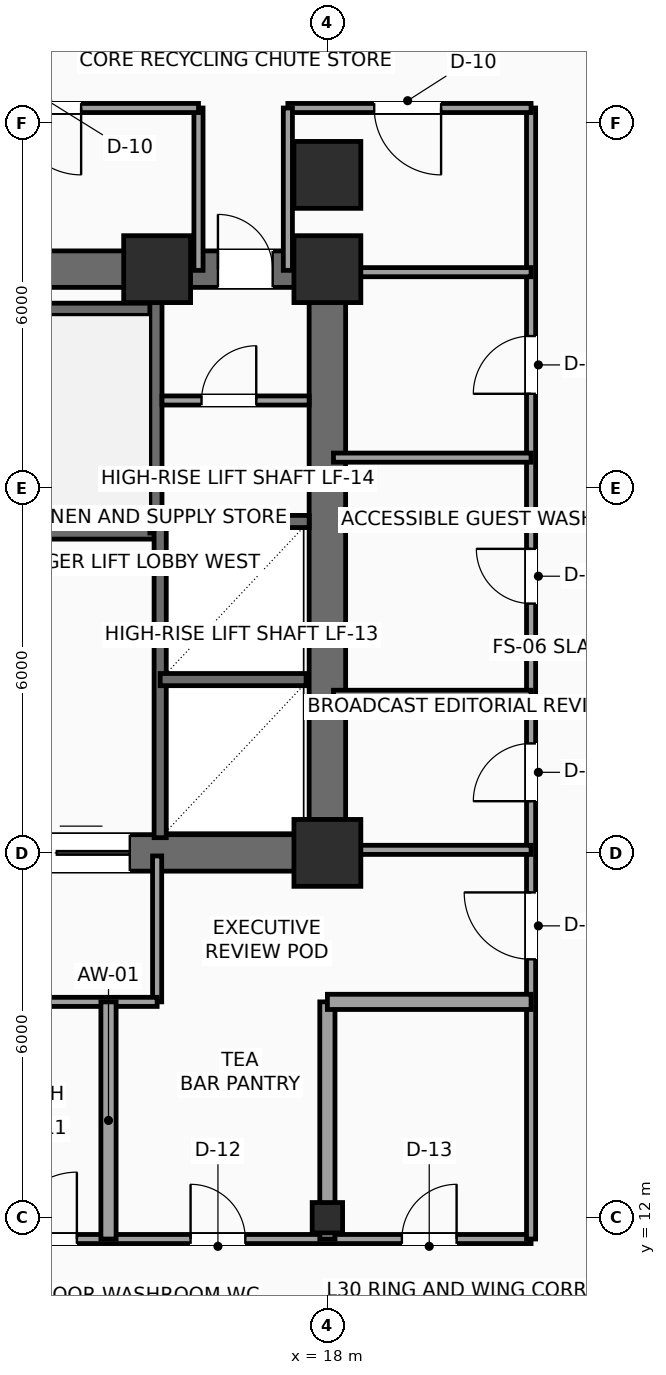
"""IFC4 building model, lengths in metres.
Left out: names, types, materials, properties, quantities, classifications, styles, units other than length and angle.
Written with IfcOpenShell. Run it as: python <this file> out.ifc"""

import sys

from ifc_helpers import new_model, si_unit, direction, frame, frame_2d, origin, origin_2d, place, context, subcontext, project, spatial, rectangle, hollow_rectangle, extrude, element, fill, save


model = new_model("IFC4")
c1 = context("Model", 3, precision=1e-05, world=origin(), true_north=direction((0.0, 1.0)))
c2 = subcontext(c1, "Body", "Model", "MODEL_VIEW")
j1 = project(units=[si_unit("LENGTHUNIT", "METRE"), si_unit("PLANEANGLEUNIT", "RADIAN")], contexts=[c1])
p1 = place(None, origin())
s1 = spatial("IfcSite", under=j1, at=p1, CompositionType="ELEMENT")
p2 = place(p1, origin())
s2 = spatial("IfcBuilding", under=s1, at=p2, CompositionType="ELEMENT")
p3 = place(p2, frame((0.0, 0.0, 126.9)))
s3 = spatial("IfcBuildingStorey", under=s2, at=p3, CompositionType="ELEMENT", Elevation=126.9)
for number, where, z_axis, x_axis in (
    (1, (18.0, 18.0, 0.0), (0.0, 0.0, 1.0), (1.0, 0.0, 0.0)),
    (2, (15.2, 27.6, 0.0), (0.0, 0.0, 1.0), (1.0, 0.0, 0.0)),
    (3, (18.0, 27.6, 0.0), (0.0, 0.0, 1.0), (1.0, 0.0, 0.0)),
):
    element("IfcColumn", number, at=place(p3, frame(where, z_axis=z_axis, x_axis=x_axis)), inside=s3, PredefinedType="COLUMN", context=c2, shape_type="SweptSolid", body=[
        extrude(rectangle(XDim=1.1, YDim=1.1, at=origin_2d()), origin(), (0.0, 0.0, 1.0), 3.75),
    ])
p4 = place(p3, frame((18.0, 12.0, 0.0), z_axis=(0.0, 0.0, 1.0), x_axis=(1.0, 0.0, 0.0)))
e4 = element("IfcColumn", 4, at=p4, inside=s3, PredefinedType="COLUMN", context=c2, shape_type="SweptSolid", body=[
    extrude(hollow_rectangle(XDim=0.5, YDim=0.5, WallThickness=0.025, InnerFilletRadius=0.025, OuterFilletRadius=0.04, at=origin_2d()), origin(), (0.0, 0.0, 1.0), 3.75),
])
p5 = place(p3, frame((18.0, 29.15, 0.0), z_axis=(0.0, 0.0, 1.0), x_axis=(1.0, 0.0, 0.0)))
e5 = element("IfcColumn", 5, at=p5, inside=s3, PredefinedType="COLUMN", context=c2, shape_type="SweptSolid", body=[
    extrude(rectangle(XDim=1.1, YDim=1.1, at=origin_2d()), origin(), (0.0, 0.0, 1.0), 3.75),
])
p6 = place(p3, frame((6.0, 18.0, 0.0), z_axis=(0.0, 0.0, 1.0), x_axis=(1.0, 0.0, 0.0)))
e6 = element("IfcWall", 6, at=p6, inside=s3, PredefinedType="SHEAR", context=c2, shape_type="SweptSolid", body=[
    extrude(rectangle(XDim=12.0, YDim=0.6, at=frame_2d((6.0, 0.0))), origin(), (0.0, 0.0, 1.0), 3.525),
])
p7 = place(p6, frame((7.15, 0.0, 0.0)))
e7 = element("IfcOpeningElement", 7, at=p7, cuts=e6, PredefinedType="OPENING", context=c2, shape_type="SweptSolid", body=[
    extrude(rectangle(XDim=1.6, YDim=2.3, at=frame_2d((0.8, 1.15))), frame((0.0, 0.31, 0.0), z_axis=(0.0, -1.0, 0.0), x_axis=(1.0, 0.0, 0.0)), (0.0, 0.0, 1.0), 0.62),
])
p8 = place(p3, frame((6.0, 27.6, 0.0), z_axis=(0.0, 0.0, 1.0), x_axis=(1.0, 0.0, 0.0)))
e8 = element("IfcWall", 8, at=p8, inside=s3, PredefinedType="SHEAR", context=c2, shape_type="SweptSolid", body=[
    extrude(rectangle(XDim=12.0, YDim=0.6, at=frame_2d((6.0, 0.0))), origin(), (0.0, 0.0, 1.0), 3.525),
])
p9 = place(p8, frame((10.2, 0.0, 0.0)))
e9 = element("IfcOpeningElement", 9, at=p9, cuts=e8, PredefinedType="OPENING", context=c2, shape_type="SweptSolid", body=[
    extrude(rectangle(XDim=0.9, YDim=2.15, at=frame_2d((0.45, 1.075))), frame((0.0, 0.31, 0.0), z_axis=(0.0, -1.0, 0.0), x_axis=(1.0, 0.0, 0.0)), (0.0, 0.0, 1.0), 0.62),
])
p10 = place(p3, frame((18.0, 18.0, 0.0), z_axis=(0.0, 0.0, 1.0), x_axis=(0.0, 1.0, 0.0)))
e10 = element("IfcWall", 10, at=p10, inside=s3, PredefinedType="SHEAR", context=c2, shape_type="SweptSolid", body=[
    extrude(rectangle(XDim=9.6, YDim=0.6, at=frame_2d((4.8, 0.0))), origin(), (0.0, 0.0, 1.0), 3.525),
])
p11 = place(p3, frame((6.3, 23.26, 0.0), z_axis=(0.0, 0.0, 1.0), x_axis=(1.0, 0.0, 0.0)))
e11 = element("IfcWall", 11, at=p11, inside=s3, PredefinedType="SHEAR", context=c2, shape_type="SweptSolid", body=[
    extrude(rectangle(XDim=8.88, YDim=0.2, at=frame_2d((4.44, 0.0))), origin(), (0.0, 0.0, 1.0), 3.525),
])
p12 = place(p11, frame((0.35, 0.0, 0.0)))
e12 = element("IfcOpeningElement", 12, at=p12, cuts=e11, PredefinedType="OPENING", context=c2, shape_type="SweptSolid", body=[
    extrude(rectangle(XDim=1.1, YDim=2.2, at=frame_2d((0.55, 1.1))), frame((0.0, 0.11, 0.0), z_axis=(0.0, -1.0, 0.0), x_axis=(1.0, 0.0, 0.0)), (0.0, 0.0, 1.0), 0.22),
])
p13 = place(p3, frame((6.3, 26.94, 0.0), z_axis=(0.0, 0.0, 1.0), x_axis=(1.0, 0.0, 0.0)))
e13 = element("IfcWall", 13, at=p13, inside=s3, PredefinedType="SHEAR", context=c2, shape_type="SweptSolid", body=[
    extrude(rectangle(XDim=8.88, YDim=0.2, at=frame_2d((4.44, 0.0))), origin(), (0.0, 0.0, 1.0), 3.525),
])
p14 = place(p3, frame((15.18, 23.26, 0.0), z_axis=(0.0, 0.0, 1.0), x_axis=(0.0, 1.0, 0.0)))
e14 = element("IfcWall", 14, at=p14, inside=s3, PredefinedType="SHEAR", context=c2, shape_type="SweptSolid", body=[
    extrude(rectangle(XDim=4.04, YDim=0.2, at=frame_2d((2.02, 0.0))), origin(), (0.0, 0.0, 1.0), 3.525),
])
p15 = place(p3, frame((15.25, 18.25, 0.0), z_axis=(0.0, 0.0, 1.0), x_axis=(0.0, 1.0, 0.0)))
e15 = element("IfcWall", 15, at=p15, inside=s3, PredefinedType="SHEAR", context=c2, shape_type="SweptSolid", body=[
    extrude(rectangle(XDim=5.2, YDim=0.2, at=frame_2d((2.6, 0.0))), origin(), (0.0, 0.0, 1.0), 3.525),
])
p16 = place(p3, frame((15.25, 20.85, 0.0), z_axis=(0.0, 0.0, 1.0), x_axis=(1.0, 0.0, 0.0)))
e16 = element("IfcWall", 16, at=p16, inside=s3, PredefinedType="SHEAR", context=c2, shape_type="SweptSolid", body=[
    extrude(rectangle(XDim=2.4, YDim=0.2, at=frame_2d((1.2, 0.0))), origin(), (0.0, 0.0, 1.0), 3.525),
])
p17 = place(p3, frame((15.25, 23.45, 0.0), z_axis=(0.0, 0.0, 1.0), x_axis=(1.0, 0.0, 0.0)))
e17 = element("IfcWall", 17, at=p17, inside=s3, PredefinedType="SHEAR", context=c2, shape_type="SweptSolid", body=[
    extrude(rectangle(XDim=2.45, YDim=0.2, at=frame_2d((1.225, 0.0))), origin(), (0.0, 0.0, 1.0), 3.525),
])
p18 = place(p3, frame((15.28, 25.44, 0.0), z_axis=(0.0, 0.0, 1.0), x_axis=(1.0, 0.0, 0.0)))
e18 = element("IfcWall", 18, at=p18, inside=s3, PredefinedType="PARTITIONING", context=c2, shape_type="SweptSolid", body=[
    extrude(rectangle(XDim=2.42, YDim=0.15, at=frame_2d((1.21, 0.0))), origin(), (0.0, 0.0, 1.0), 3.525),
])
p19 = place(p18, frame((0.65, 0.0, 0.0)))
e19 = element("IfcOpeningElement", 19, at=p19, cuts=e18, PredefinedType="OPENING", context=c2, shape_type="SweptSolid", body=[
    extrude(rectangle(XDim=0.9, YDim=2.15, at=frame_2d((0.45, 1.075))), frame((0.0, 0.085, 0.0), z_axis=(0.0, -1.0, 0.0), x_axis=(1.0, 0.0, 0.0)), (0.0, 0.0, 1.0), 0.17),
])
p20 = place(p3, frame((15.2, 17.95, 0.0), z_axis=(0.0, 0.0, 1.0), x_axis=(0.0, -1.0, 0.0)))
e20 = element("IfcWall", 20, at=p20, inside=s3, PredefinedType="PARTITIONING", context=c2, shape_type="SweptSolid", body=[
    extrude(rectangle(XDim=2.4, YDim=0.15, at=frame_2d((1.2, 0.0))), origin(), (0.0, 0.0, 1.0), 3.525),
])
p21 = place(p3, frame((15.2, 15.55, 0.0), z_axis=(0.0, 0.0, 1.0), x_axis=(-1.0, 0.0, 0.0)))
e21 = element("IfcWall", 21, at=p21, inside=s3, PredefinedType="PARTITIONING", context=c2, shape_type="SweptSolid", body=[
    extrude(rectangle(XDim=4.4, YDim=0.15, at=frame_2d((2.2, 0.0))), origin(), (0.0, 0.0, 1.0), 3.525),
])
p22 = place(p3, frame((10.8, 11.65, 0.0), z_axis=(0.0, 0.0, 1.0), x_axis=(1.0, 0.0, 0.0)))
e22 = element("IfcWall", 22, at=p22, inside=s3, PredefinedType="PARTITIONING", context=c2, shape_type="SweptSolid", body=[
    extrude(rectangle(XDim=10.55, YDim=0.15, at=frame_2d((5.275, 0.0))), origin(), (0.0, 0.0, 1.0), 3.525),
])
p23 = place(p22, frame((1.98, 0.0, 0.0)))
e23 = element("IfcOpeningElement", 23, at=p23, cuts=e22, PredefinedType="OPENING", context=c2, shape_type="SweptSolid", body=[
    extrude(rectangle(XDim=1.1, YDim=2.25, at=frame_2d((0.55, 1.125))), frame((0.0, 0.085, 0.0), z_axis=(0.0, -1.0, 0.0), x_axis=(1.0, 0.0, 0.0)), (0.0, 0.0, 1.0), 0.17),
])
p24 = place(p22, frame((4.95, 0.0, 0.0)))
e24 = element("IfcOpeningElement", 24, at=p24, cuts=e22, PredefinedType="OPENING", context=c2, shape_type="SweptSolid", body=[
    extrude(rectangle(XDim=0.9, YDim=2.1, at=frame_2d((0.45, 1.05))), frame((0.0, 0.085, 0.0), z_axis=(0.0, -1.0, 0.0), x_axis=(1.0, 0.0, 0.0)), (0.0, 0.0, 1.0), 0.17),
])
p25 = place(p22, frame((8.425, 0.0, 0.0)))
e25 = element("IfcOpeningElement", 25, at=p25, cuts=e22, PredefinedType="OPENING", context=c2, shape_type="SweptSolid", body=[
    extrude(rectangle(XDim=0.9, YDim=2.1, at=frame_2d((0.45, 1.05))), frame((0.0, 0.085, 0.0), z_axis=(0.0, -1.0, 0.0), x_axis=(1.0, 0.0, 0.0)), (0.0, 0.0, 1.0), 0.17),
])
p26 = place(p3, frame((21.35, 11.65, 0.0), z_axis=(0.0, 0.0, 1.0), x_axis=(0.0, 1.0, 0.0)))
e26 = element("IfcWall", 26, at=p26, inside=s3, PredefinedType="PARTITIONING", context=c2, shape_type="SweptSolid", body=[
    extrude(rectangle(XDim=18.6, YDim=0.15, at=frame_2d((9.3, 0.0))), origin(), (0.0, 0.0, 1.0), 3.525),
])
p27 = place(p26, frame((7.2, 0.0, 0.0)))
e27 = element("IfcOpeningElement", 27, at=p27, cuts=e26, PredefinedType="OPENING", context=c2, shape_type="SweptSolid", body=[
    extrude(rectangle(XDim=0.95, YDim=2.15, at=frame_2d((0.475, 1.075))), frame((0.0, 0.085, 0.0), z_axis=(0.0, -1.0, 0.0), x_axis=(1.0, 0.0, 0.0)), (0.0, 0.0, 1.0), 0.17),
])
p28 = place(p26, frame((10.45, 0.0, 0.0)))
e28 = element("IfcOpeningElement", 28, at=p28, cuts=e26, PredefinedType="OPENING", context=c2, shape_type="SweptSolid", body=[
    extrude(rectangle(XDim=0.9, YDim=2.1, at=frame_2d((0.45, 1.05))), frame((0.0, 0.085, 0.0), z_axis=(0.0, -1.0, 0.0), x_axis=(1.0, 0.0, 0.0)), (0.0, 0.0, 1.0), 0.17),
])
p29 = place(p26, frame((13.9, 0.0, 0.0)))
e29 = element("IfcOpeningElement", 29, at=p29, cuts=e26, PredefinedType="OPENING", context=c2, shape_type="SweptSolid", body=[
    extrude(rectangle(XDim=0.95, YDim=2.15, at=frame_2d((0.475, 1.075))), frame((0.0, 0.085, 0.0), z_axis=(0.0, -1.0, 0.0), x_axis=(1.0, 0.0, 0.0)), (0.0, 0.0, 1.0), 0.17),
])
p30 = place(p26, frame((4.6, 0.0, 0.0)))
e30 = element("IfcOpeningElement", 30, at=p30, cuts=e26, PredefinedType="OPENING", context=c2, shape_type="SweptSolid", body=[
    extrude(rectangle(XDim=1.1, YDim=2.25, at=frame_2d((0.55, 1.125))), frame((0.0, 0.085, 0.0), z_axis=(0.0, -1.0, 0.0), x_axis=(1.0, 0.0, 0.0)), (0.0, 0.0, 1.0), 0.17),
])
p31 = place(p3, frame((21.35, 30.25, 0.0), z_axis=(0.0, 0.0, 1.0), x_axis=(-1.0, 0.0, 0.0)))
e31 = element("IfcWall", 31, at=p31, inside=s3, PredefinedType="PARTITIONING", context=c2, shape_type="SweptSolid", body=[
    extrude(rectangle(XDim=4.0, YDim=0.15, at=frame_2d((2.0, 0.0))), origin(), (0.0, 0.0, 1.0), 3.525),
])
p32 = place(p31, frame((1.48, 0.0, 0.0)))
e32 = element("IfcOpeningElement", 32, at=p32, cuts=e31, PredefinedType="OPENING", context=c2, shape_type="SweptSolid", body=[
    extrude(rectangle(XDim=1.1, YDim=2.25, at=frame_2d((0.55, 1.125))), frame((0.0, 0.085, 0.0), z_axis=(0.0, -1.0, 0.0), x_axis=(1.0, 0.0, 0.0)), (0.0, 0.0, 1.0), 0.17),
])
for number, where, z_axis, x_axis in (
    (33, (17.35, 30.25, 0.0), (0.0, 0.0, 1.0), (0.0, -1.0, 0.0)),
    (34, (15.88, 27.58, 0.0), (0.0, 0.0, 1.0), (0.0, 1.0, 0.0)),
):
    element("IfcWall", number, at=place(p3, frame(where, z_axis=z_axis, x_axis=x_axis)), inside=s3, PredefinedType="PARTITIONING", context=c2, shape_type="SweptSolid", body=[
        extrude(rectangle(XDim=2.67, YDim=0.15, at=frame_2d((1.335, 0.0))), origin(), (0.0, 0.0, 1.0), 3.525),
    ])
p33 = place(p3, frame((15.88, 30.25, 0.0), z_axis=(0.0, 0.0, 1.0), x_axis=(-1.0, 0.0, 0.0)))
e35 = element("IfcWall", 35, at=p33, inside=s3, PredefinedType="PARTITIONING", context=c2, shape_type="SweptSolid", body=[
    extrude(rectangle(XDim=15.58, YDim=0.15, at=frame_2d((7.79, 0.0))), origin(), (0.0, 0.0, 1.0), 3.525),
])
p34 = place(p33, frame((12.23, 0.0, 0.0)))
e36 = element("IfcOpeningElement", 36, at=p34, cuts=e35, PredefinedType="OPENING", context=c2, shape_type="SweptSolid", body=[
    extrude(rectangle(XDim=1.1, YDim=2.25, at=frame_2d((0.55, 1.125))), frame((0.0, 0.085, 0.0), z_axis=(0.0, -1.0, 0.0), x_axis=(1.0, 0.0, 0.0)), (0.0, 0.0, 1.0), 0.17),
])
p35 = place(p33, frame((6.68, 0.0, 0.0)))
e37 = element("IfcOpeningElement", 37, at=p35, cuts=e35, PredefinedType="OPENING", context=c2, shape_type="SweptSolid", body=[
    extrude(rectangle(XDim=1.1, YDim=2.25, at=frame_2d((0.55, 1.125))), frame((0.0, 0.085, 0.0), z_axis=(0.0, -1.0, 0.0), x_axis=(1.0, 0.0, 0.0)), (0.0, 0.0, 1.0), 0.17),
])
p36 = place(p33, frame((1.93, 0.0, 0.0)))
e38 = element("IfcOpeningElement", 38, at=p36, cuts=e35, PredefinedType="OPENING", context=c2, shape_type="SweptSolid", body=[
    extrude(rectangle(XDim=1.1, YDim=2.25, at=frame_2d((0.55, 1.125))), frame((0.0, 0.085, 0.0), z_axis=(0.0, -1.0, 0.0), x_axis=(1.0, 0.0, 0.0)), (0.0, 0.0, 1.0), 0.17),
])
p37 = place(p3, frame((14.4, 11.65, 0.0), z_axis=(0.0, 0.0, 1.0), x_axis=(0.0, 1.0, 0.0)))
e39 = element("IfcWall", 39, at=p37, inside=s3, PredefinedType="PARTITIONING", context=c2, shape_type="SweptSolid", body=[
    extrude(rectangle(XDim=3.9, YDim=0.25, at=frame_2d((1.95, 0.0))), origin(), (0.0, 0.0, 1.0), 3.525),
])
p38 = place(p3, frame((18.0, 11.65, 0.0), z_axis=(0.0, 0.0, 1.0), x_axis=(0.0, 1.0, 0.0)))
e40 = element("IfcWall", 40, at=p38, inside=s3, PredefinedType="PARTITIONING", context=c2, shape_type="SweptSolid", body=[
    extrude(rectangle(XDim=3.9, YDim=0.25, at=frame_2d((1.95, 0.0))), origin(), (0.0, 0.0, 1.0), 3.017),
])
p39 = place(p3, frame((18.0, 15.55, 0.0), z_axis=(0.0, 0.0, 1.0), x_axis=(1.0, 0.0, 0.0)))
e41 = element("IfcWall", 41, at=p39, inside=s3, PredefinedType="PARTITIONING", context=c2, shape_type="SweptSolid", body=[
    extrude(rectangle(XDim=3.35, YDim=0.25, at=frame_2d((1.675, 0.0))), origin(), (0.0, 0.0, 1.0), 3.525),
])
p40 = place(p3, frame((18.1, 18.05, 0.0), z_axis=(0.0, 0.0, 1.0), x_axis=(1.0, 0.0, 0.0)))
e42 = element("IfcWall", 42, at=p40, inside=s3, PredefinedType="PARTITIONING", context=c2, shape_type="SweptSolid", body=[
    extrude(rectangle(XDim=3.25, YDim=0.15, at=frame_2d((1.625, 0.0))), origin(), (0.0, 0.0, 1.0), 3.017),
])
for number, where, z_axis, x_axis in (
    (43, (18.1, 20.6, 0.0), (0.0, 0.0, 1.0), (1.0, 0.0, 0.0)),
    (44, (18.1, 24.5, 0.0), (0.0, 0.0, 1.0), (1.0, 0.0, 0.0)),
    (45, (18.1, 27.55, 0.0), (0.0, 0.0, 1.0), (1.0, 0.0, 0.0)),
):
    element("IfcWall", number, at=place(p3, frame(where, z_axis=z_axis, x_axis=x_axis)), inside=s3, PredefinedType="PARTITIONING", context=c2, shape_type="SweptSolid", body=[
        extrude(rectangle(XDim=3.25, YDim=0.15, at=frame_2d((1.625, 0.0))), origin(), (0.0, 0.0, 1.0), 3.525),
    ])
p41 = place(p7, origin())
e46 = element("IfcDoor", 46, at=p41, inside=s3, OperationType="DOUBLE_DOOR_SLIDING", PredefinedType="DOOR", context=c2, shape_type="SweptSolid", body=[
    extrude(rectangle(XDim=1.6, YDim=2.3, at=frame_2d((0.8, 1.15))), frame((0.0, 0.025, 0.0), z_axis=(0.0, -1.0, 0.0), x_axis=(1.0, 0.0, 0.0)), (0.0, 0.0, 1.0), 0.05),
])
fill(e7, e46)
p42 = place(p9, origin())
e47 = element("IfcDoor", 47, at=p42, inside=s3, OperationType="SINGLE_SWING_LEFT", PredefinedType="DOOR", context=c2, shape_type="SweptSolid", body=[
    extrude(rectangle(XDim=0.9, YDim=2.15, at=frame_2d((0.45, 1.075))), frame((0.0, 0.025, 0.0), z_axis=(0.0, -1.0, 0.0), x_axis=(1.0, 0.0, 0.0)), (0.0, 0.0, 1.0), 0.05),
])
fill(e9, e47)
p43 = place(p19, origin())
e48 = element("IfcDoor", 48, at=p43, inside=s3, OperationType="SINGLE_SWING_RIGHT", PredefinedType="DOOR", context=c2, shape_type="SweptSolid", body=[
    extrude(rectangle(XDim=0.9, YDim=2.15, at=frame_2d((0.45, 1.075))), frame((0.0, 0.025, 0.0), z_axis=(0.0, -1.0, 0.0), x_axis=(1.0, 0.0, 0.0)), (0.0, 0.0, 1.0), 0.05),
])
fill(e19, e48)
p44 = place(p23, origin())
e49 = element("IfcDoor", 49, at=p44, inside=s3, OperationType="SINGLE_SWING_RIGHT", PredefinedType="DOOR", context=c2, shape_type="SweptSolid", body=[
    extrude(rectangle(XDim=1.1, YDim=2.25, at=frame_2d((0.55, 1.125))), frame((0.0, 0.025, 0.0), z_axis=(0.0, -1.0, 0.0), x_axis=(1.0, 0.0, 0.0)), (0.0, 0.0, 1.0), 0.05),
])
fill(e23, e49)
p45 = place(p24, origin())
e50 = element("IfcDoor", 50, at=p45, inside=s3, OperationType="SINGLE_SWING_LEFT", PredefinedType="DOOR", context=c2, shape_type="SweptSolid", body=[
    extrude(rectangle(XDim=0.9, YDim=2.1, at=frame_2d((0.45, 1.05))), frame((0.0, 0.025, 0.0), z_axis=(0.0, -1.0, 0.0), x_axis=(1.0, 0.0, 0.0)), (0.0, 0.0, 1.0), 0.05),
])
fill(e24, e50)
p46 = place(p25, origin())
e51 = element("IfcDoor", 51, at=p46, inside=s3, OperationType="SINGLE_SWING_RIGHT", PredefinedType="DOOR", context=c2, shape_type="SweptSolid", body=[
    extrude(rectangle(XDim=0.9, YDim=2.1, at=frame_2d((0.45, 1.05))), frame((0.0, 0.025, 0.0), z_axis=(0.0, -1.0, 0.0), x_axis=(1.0, 0.0, 0.0)), (0.0, 0.0, 1.0), 0.05),
])
fill(e25, e51)
p47 = place(p27, origin())
e52 = element("IfcDoor", 52, at=p47, inside=s3, OperationType="SINGLE_SWING_LEFT", PredefinedType="DOOR", context=c2, shape_type="SweptSolid", body=[
    extrude(rectangle(XDim=0.95, YDim=2.15, at=frame_2d((0.475, 1.075))), frame((0.0, 0.025, 0.0), z_axis=(0.0, -1.0, 0.0), x_axis=(1.0, 0.0, 0.0)), (0.0, 0.0, 1.0), 0.05),
])
fill(e27, e52)
p48 = place(p28, origin())
e53 = element("IfcDoor", 53, at=p48, inside=s3, OperationType="SINGLE_SWING_RIGHT", PredefinedType="DOOR", context=c2, shape_type="SweptSolid", body=[
    extrude(rectangle(XDim=0.9, YDim=2.1, at=frame_2d((0.45, 1.05))), frame((0.0, 0.025, 0.0), z_axis=(0.0, -1.0, 0.0), x_axis=(1.0, 0.0, 0.0)), (0.0, 0.0, 1.0), 0.05),
])
fill(e28, e53)
p49 = place(p29, origin())
e54 = element("IfcDoor", 54, at=p49, inside=s3, OperationType="SINGLE_SWING_LEFT", PredefinedType="DOOR", context=c2, shape_type="SweptSolid", body=[
    extrude(rectangle(XDim=0.95, YDim=2.15, at=frame_2d((0.475, 1.075))), frame((0.0, 0.025, 0.0), z_axis=(0.0, -1.0, 0.0), x_axis=(1.0, 0.0, 0.0)), (0.0, 0.0, 1.0), 0.05),
])
fill(e29, e54)
p50 = place(p30, origin())
e55 = element("IfcDoor", 55, at=p50, inside=s3, OperationType="SINGLE_SWING_RIGHT", PredefinedType="DOOR", context=c2, shape_type="SweptSolid", body=[
    extrude(rectangle(XDim=1.1, YDim=2.25, at=frame_2d((0.55, 1.125))), frame((0.0, 0.025, 0.0), z_axis=(0.0, -1.0, 0.0), x_axis=(1.0, 0.0, 0.0)), (0.0, 0.0, 1.0), 0.05),
])
fill(e30, e55)
p51 = place(p32, origin())
e56 = element("IfcDoor", 56, at=p51, inside=s3, OperationType="SINGLE_SWING_LEFT", PredefinedType="DOOR", context=c2, shape_type="SweptSolid", body=[
    extrude(rectangle(XDim=1.1, YDim=2.25, at=frame_2d((0.55, 1.125))), frame((0.0, 0.025, 0.0), z_axis=(0.0, -1.0, 0.0), x_axis=(1.0, 0.0, 0.0)), (0.0, 0.0, 1.0), 0.05),
])
fill(e32, e56)
p52 = place(p36, origin())
e57 = element("IfcDoor", 57, at=p52, inside=s3, OperationType="SINGLE_SWING_LEFT", PredefinedType="DOOR", context=c2, shape_type="SweptSolid", body=[
    extrude(rectangle(XDim=1.1, YDim=2.25, at=frame_2d((0.55, 1.125))), frame((0.0, 0.025, 0.0), z_axis=(0.0, -1.0, 0.0), x_axis=(1.0, 0.0, 0.0)), (0.0, 0.0, 1.0), 0.05),
])
fill(e38, e57)
save(model, sys.argv[1])
